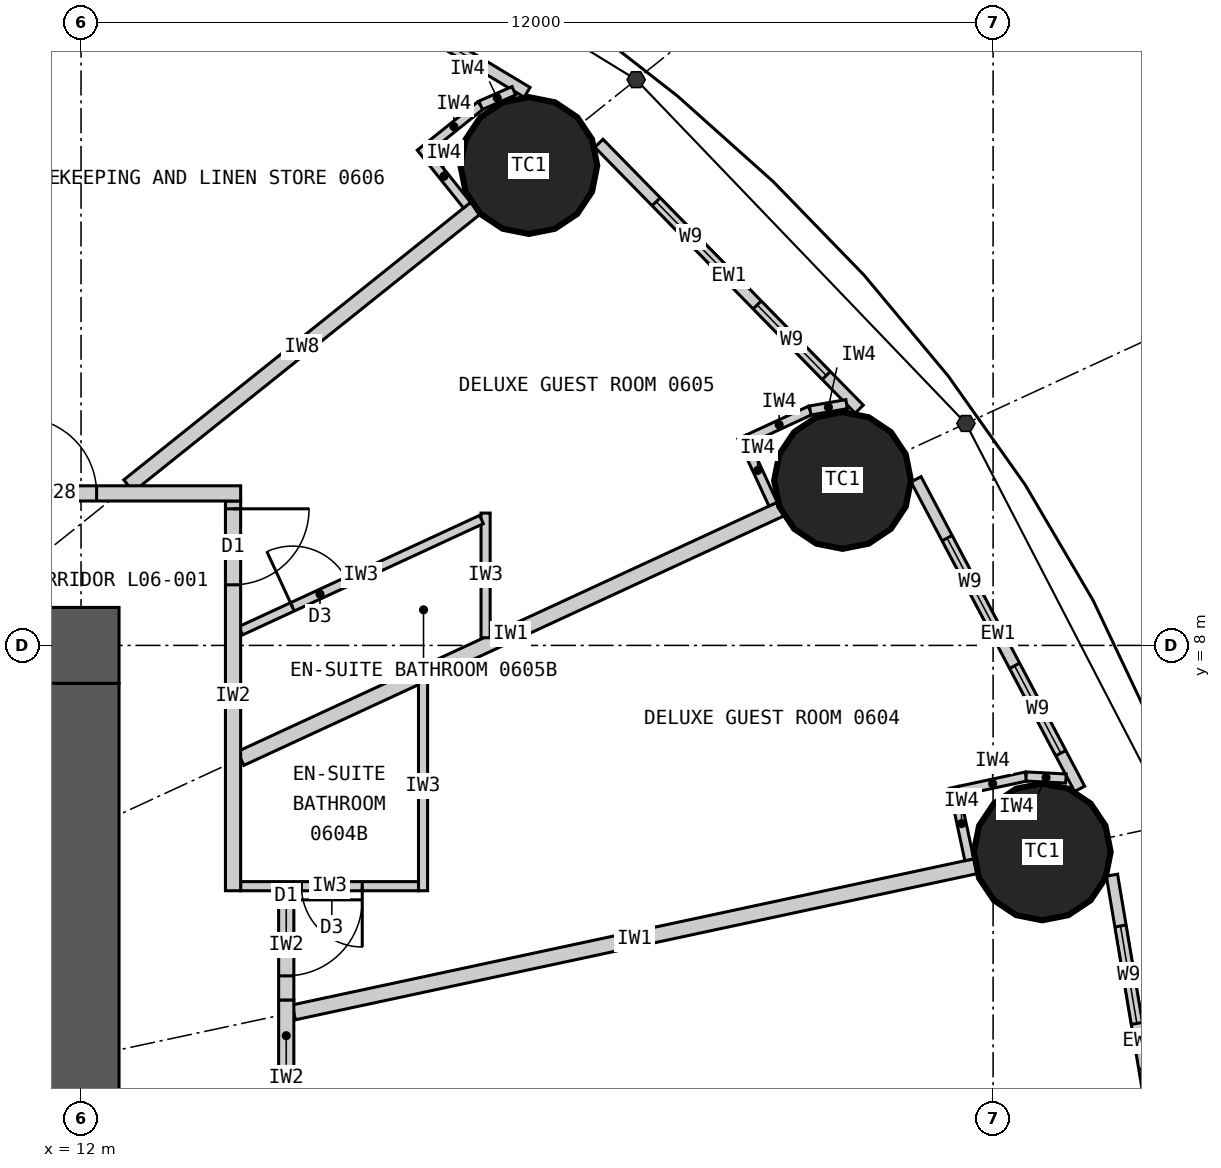
"""IFC4 building model, lengths in metres.
Left out: names, types, materials, properties, quantities, classifications, styles, units other than length and angle.
Written with IfcOpenShell. Run it as: python <this file> out.ifc"""

import sys

from ifc_helpers import new_model, si_unit, direction, frame, frame_2d, origin, origin_2d, place, context, subcontext, project, spatial, rectangle, circle, extrude, element, fill, save


model = new_model("IFC4")
c1 = context("Model", 3, precision=1e-05, world=origin(), true_north=direction((0.0, 1.0)))
c2 = subcontext(c1, "Body", "Model", "MODEL_VIEW")
j1 = project(units=[si_unit("LENGTHUNIT", "METRE"), si_unit("PLANEANGLEUNIT", "RADIAN")], contexts=[c1])
p1 = place(None, origin())
s1 = spatial("IfcSite", under=j1, at=p1, CompositionType="ELEMENT")
p2 = place(p1, origin())
s2 = spatial("IfcBuilding", under=s1, at=p2, CompositionType="ELEMENT")
p3 = place(p2, frame((0.0, 0.0, 32.7)))
s3 = spatial("IfcBuildingStorey", under=s2, at=p3, CompositionType="ELEMENT", Elevation=32.7)
for number, where, z_axis, x_axis in (
    (1, (24.647, 5.283, 0.0), (0.0, 0.0, 1.0), (1.0, 0.0, 0.0)),
    (2, (22.019, 10.17, 0.0), (0.0, 0.0, 1.0), (1.0, 0.0, 0.0)),
    (3, (17.892, 14.313, 0.0), (0.0, 0.0, 1.0), (1.0, 0.0, 0.0)),
):
    element("IfcColumn", number, at=place(p3, frame(where, z_axis=z_axis, x_axis=x_axis)), inside=s3, PredefinedType="COLUMN", context=c2, shape_type="SweptSolid", body=[
        extrude(circle(Radius=0.9, at=origin_2d()), origin(), (0.0, 0.0, 1.0), 3.3),
    ])
p4 = place(p3, frame((-12.5, 8.0, 0.0), z_axis=(0.0, 0.0, 1.0), x_axis=(1.0, 0.0, 0.0)))
e4 = element("IfcWall", 4, at=p4, inside=s3, PredefinedType="SHEAR", context=c2, shape_type="SweptSolid", body=[
    extrude(rectangle(XDim=25.0, YDim=1.0, at=frame_2d((12.5, 0.0))), origin(), (0.0, 0.0, 1.0), 3.3),
])
p5 = place(p4, frame((11.2, 0.0, 0.0)))
e5 = element("IfcOpeningElement", 5, at=p5, cuts=e4, PredefinedType="OPENING", context=c2, shape_type="SweptSolid", body=[
    extrude(rectangle(XDim=1.2, YDim=2.2, at=frame_2d((0.6, 1.1))), frame((0.0, 0.51, 0.0), z_axis=(0.0, -1.0, 0.0), x_axis=(1.0, 0.0, 0.0)), (0.0, 0.0, 1.0), 1.02),
])
p6 = place(p4, frame((18.8, 0.0, 0.0)))
e6 = element("IfcOpeningElement", 6, at=p6, cuts=e4, PredefinedType="OPENING", context=c2, shape_type="SweptSolid", body=[
    extrude(rectangle(XDim=0.9, YDim=2.2, at=frame_2d((0.45, 1.1))), frame((0.0, 0.51, 0.0), z_axis=(0.0, -1.0, 0.0), x_axis=(1.0, 0.0, 0.0)), (0.0, 0.0, 1.0), 1.02),
])
p7 = place(p3, frame((12.0, -7.5, 0.0), z_axis=(0.0, 0.0, 1.0), x_axis=(0.0, 1.0, 0.0)))
e7 = element("IfcWall", 7, at=p7, inside=s3, PredefinedType="SHEAR", context=c2, shape_type="SweptSolid", body=[
    extrude(rectangle(XDim=15.0, YDim=1.0, at=frame_2d((7.5, 0.0))), origin(), (0.0, 0.0, 1.0), 3.3),
])
p8 = place(p7, frame((6.6, 0.0, 0.0)))
e8 = element("IfcOpeningElement", 8, at=p8, cuts=e7, PredefinedType="OPENING", context=c2, shape_type="SweptSolid", body=[
    extrude(rectangle(XDim=1.8, YDim=2.2, at=frame_2d((0.9, 1.1))), frame((0.0, 0.51, 0.0), z_axis=(0.0, -1.0, 0.0), x_axis=(1.0, 0.0, 0.0)), (0.0, 0.0, 1.0), 1.02),
])
p9 = place(p3, frame((26.297, 0.611, 0.0), z_axis=(0.0, 0.0, 1.0), x_axis=(-0.165641751141, 0.986185991727, 0.0)))
e9 = element("IfcWall", 9, at=p9, inside=s3, PredefinedType="ELEMENTEDWALL", context=c2, shape_type="SweptSolid", body=[
    extrude(rectangle(XDim=4.428, YDim=0.15, at=frame_2d((2.214, 0.0))), origin(), (0.0, 0.0, 1.0), 3.12),
])
p10 = place(p9, frame((0.55, 0.0, 0.9)))
e10 = element("IfcOpeningElement", 10, at=p10, cuts=e9, PredefinedType="OPENING", context=c2, shape_type="SweptSolid", body=[
    extrude(rectangle(XDim=1.3, YDim=1.9, at=frame_2d((0.65, 0.95))), frame((0.0, 0.085, 0.0), z_axis=(0.0, -1.0, 0.0), x_axis=(1.0, 0.0, 0.0)), (0.0, 0.0, 1.0), 0.17),
])
p11 = place(p9, frame((2.45, 0.0, 0.9)))
e11 = element("IfcOpeningElement", 11, at=p11, cuts=e9, PredefinedType="OPENING", context=c2, shape_type="SweptSolid", body=[
    extrude(rectangle(XDim=1.3, YDim=1.9, at=frame_2d((0.65, 0.95))), frame((0.0, 0.085, 0.0), z_axis=(0.0, -1.0, 0.0), x_axis=(1.0, 0.0, 0.0)), (0.0, 0.0, 1.0), 0.17),
])
p12 = place(p3, frame((25.139, 6.113, 0.0), z_axis=(0.0, 0.0, 1.0), x_axis=(-0.467303182954, 0.884097129959, 0.0)))
e12 = element("IfcWall", 12, at=p12, inside=s3, PredefinedType="ELEMENTEDWALL", context=c2, shape_type="SweptSolid", body=[
    extrude(rectangle(XDim=4.606, YDim=0.15, at=frame_2d((2.303, 0.0))), origin(), (0.0, 0.0, 1.0), 3.12),
])
p13 = place(p12, frame((0.531, 0.0, 0.9)))
e13 = element("IfcOpeningElement", 13, at=p13, cuts=e12, PredefinedType="OPENING", context=c2, shape_type="SweptSolid", body=[
    extrude(rectangle(XDim=1.3, YDim=1.9, at=frame_2d((0.65, 0.95))), frame((0.0, 0.085, 0.0), z_axis=(0.0, -1.0, 0.0), x_axis=(1.0, 0.0, 0.0)), (0.0, 0.0, 1.0), 0.17),
])
p14 = place(p12, frame((2.432, 0.0, 0.9)))
e14 = element("IfcOpeningElement", 14, at=p14, cuts=e12, PredefinedType="OPENING", context=c2, shape_type="SweptSolid", body=[
    extrude(rectangle(XDim=1.3, YDim=1.9, at=frame_2d((0.65, 0.95))), frame((0.0, 0.085, 0.0), z_axis=(0.0, -1.0, 0.0), x_axis=(1.0, 0.0, 0.0)), (0.0, 0.0, 1.0), 0.17),
])
p15 = place(p3, frame((22.239, 11.108, 0.0), z_axis=(0.0, 0.0, 1.0), x_axis=(-0.699612594083, 0.714522370679, 0.0)))
e15 = element("IfcWall", 15, at=p15, inside=s3, PredefinedType="ELEMENTEDWALL", context=c2, shape_type="SweptSolid", body=[
    extrude(rectangle(XDim=4.896, YDim=0.15, at=frame_2d((2.448, 0.0))), origin(), (0.0, 0.0, 1.0), 3.12),
])
p16 = place(p15, frame((0.619, 0.0, 0.9)))
e16 = element("IfcOpeningElement", 16, at=p16, cuts=e15, PredefinedType="OPENING", context=c2, shape_type="SweptSolid", body=[
    extrude(rectangle(XDim=1.3, YDim=1.9, at=frame_2d((0.65, 0.95))), frame((0.0, 0.085, 0.0), z_axis=(0.0, -1.0, 0.0), x_axis=(1.0, 0.0, 0.0)), (0.0, 0.0, 1.0), 0.17),
])
p17 = place(p15, frame((2.519, 0.0, 0.9)))
e17 = element("IfcOpeningElement", 17, at=p17, cuts=e15, PredefinedType="OPENING", context=c2, shape_type="SweptSolid", body=[
    extrude(rectangle(XDim=1.3, YDim=1.9, at=frame_2d((0.65, 0.95))), frame((0.0, 0.085, 0.0), z_axis=(0.0, -1.0, 0.0), x_axis=(1.0, 0.0, 0.0)), (0.0, 0.0, 1.0), 0.17),
])
p18 = place(p3, frame((17.869, 15.277, 0.0), z_axis=(0.0, 0.0, 1.0), x_axis=(-0.856958191554, 0.515385931054, 0.0)))
e18 = element("IfcWall", 18, at=p18, inside=s3, PredefinedType="ELEMENTEDWALL", context=c2, shape_type="SweptSolid", body=[
    extrude(rectangle(XDim=5.201, YDim=0.15, at=frame_2d((2.601, 0.0))), origin(), (0.0, 0.0, 1.0), 3.12),
])
p19 = place(p18, frame((0.776, 0.0, 0.9)))
e19 = element("IfcOpeningElement", 19, at=p19, cuts=e18, PredefinedType="OPENING", context=c2, shape_type="SweptSolid", body=[
    extrude(rectangle(XDim=1.3, YDim=1.9, at=frame_2d((0.65, 0.95))), frame((0.0, 0.085, 0.0), z_axis=(0.0, -1.0, 0.0), x_axis=(1.0, 0.0, 0.0)), (0.0, 0.0, 1.0), 0.17),
])
p20 = place(p18, frame((2.676, 0.0, 0.9)))
e20 = element("IfcOpeningElement", 20, at=p20, cuts=e18, PredefinedType="OPENING", context=c2, shape_type="SweptSolid", body=[
    extrude(rectangle(XDim=1.3, YDim=1.9, at=frame_2d((0.65, 0.95))), frame((0.0, 0.085, 0.0), z_axis=(0.0, -1.0, 0.0), x_axis=(1.0, 0.0, 0.0)), (0.0, 0.0, 1.0), 0.17),
])
p21 = place(p3, frame((14.8, 3.173, 0.0), z_axis=(0.0, 0.0, 1.0), x_axis=(0.977788776497, 0.209592720667, 0.0)))
e21 = element("IfcWall", 21, at=p21, inside=s3, PredefinedType="PARTITIONING", context=c2, shape_type="SweptSolid", body=[
    extrude(rectangle(XDim=9.171, YDim=0.2, at=frame_2d((4.585, 0.0))), origin(), (0.0, 0.0, 1.0), 2.32),
])
p22 = place(p3, frame((14.1, 6.512, 0.0), z_axis=(0.0, 0.0, 1.0), x_axis=(0.907842433118, 0.41931147925, 0.0)))
e22 = element("IfcWall", 22, at=p22, inside=s3, PredefinedType="PARTITIONING", context=c2, shape_type="SweptSolid", body=[
    extrude(rectangle(XDim=7.823, YDim=0.2, at=frame_2d((3.912, 0.0))), origin(), (0.0, 0.0, 1.0), 2.32),
])
p23 = place(p3, frame((12.625, 10.1, 0.0), z_axis=(0.0, 0.0, 1.0), x_axis=(0.780872884676, 0.624689953479, 0.0)))
e23 = element("IfcWall", 23, at=p23, inside=s3, PredefinedType="PARTITIONING", context=c2, shape_type="SweptSolid", body=[
    extrude(rectangle(XDim=5.845, YDim=0.2, at=frame_2d((2.922, 0.0))), origin(), (0.0, 0.0, 1.0), 2.32),
])
p24 = place(p3, frame((7.289, 10.1, 0.0), z_axis=(0.0, 0.0, 1.0), x_axis=(0.585216319319, 0.810877216108, 0.0)))
e24 = element("IfcWall", 24, at=p24, inside=s3, PredefinedType="PARTITIONING", context=c2, shape_type="SweptSolid", body=[
    extrude(rectangle(XDim=8.16, YDim=0.2, at=frame_2d((4.08, 0.0))), origin(), (0.0, 0.0, 1.0), 2.32),
])
p25 = place(p3, frame((16.5, 7.521, 0.0), z_axis=(0.0, 0.0, 1.0), x_axis=(0.0, -1.0, 0.0)))
e25 = element("IfcWall", 25, at=p25, inside=s3, PredefinedType="PARTITIONING", context=c2, shape_type="SweptSolid", body=[
    extrude(rectangle(XDim=2.749, YDim=0.12, at=frame_2d((1.374, 0.0))), origin(), (0.0, 0.0, 1.0), 3.12),
])
p26 = place(p3, frame((14.1, 4.833, 0.0), z_axis=(0.0, 0.0, 1.0), x_axis=(1.0, 0.0, 0.0)))
e26 = element("IfcWall", 26, at=p26, inside=s3, PredefinedType="PARTITIONING", context=c2, shape_type="SweptSolid", body=[
    extrude(rectangle(XDim=2.34, YDim=0.12, at=frame_2d((1.17, 0.0))), origin(), (0.0, 0.0, 1.0), 3.12),
])
p27 = place(p26, frame((0.8, 0.0, 0.0)))
e27 = element("IfcOpeningElement", 27, at=p27, cuts=e26, PredefinedType="OPENING", context=c2, shape_type="SweptSolid", body=[
    extrude(rectangle(XDim=0.8, YDim=2.1, at=frame_2d((0.4, 1.05))), frame((0.0, 0.07, 0.0), z_axis=(0.0, -1.0, 0.0), x_axis=(1.0, 0.0, 0.0)), (0.0, 0.0, 1.0), 0.14),
])
p28 = place(p3, frame((17.323, 8.101, 0.0), z_axis=(0.0, 0.0, 1.0), x_axis=(0.0, 1.0, 0.0)))
e28 = element("IfcWall", 28, at=p28, inside=s3, PredefinedType="PARTITIONING", context=c2, shape_type="SweptSolid", body=[
    extrude(rectangle(XDim=1.64, YDim=0.12, at=frame_2d((0.82, 0.0))), origin(), (0.0, 0.0, 1.0), 3.12),
])
p29 = place(p3, frame((14.1, 8.193, 0.0), z_axis=(0.0, 0.0, 1.0), x_axis=(0.907836493557, 0.419324338628, 0.0)))
e29 = element("IfcWall", 29, at=p29, inside=s3, PredefinedType="PARTITIONING", context=c2, shape_type="SweptSolid", body=[
    extrude(rectangle(XDim=3.49, YDim=0.12, at=frame_2d((1.745, 0.0))), origin(), (0.0, 0.0, 1.0), 3.12),
])
p30 = place(p29, frame((0.75, 0.0, 0.0)))
e30 = element("IfcOpeningElement", 30, at=p30, cuts=e29, PredefinedType="OPENING", context=c2, shape_type="SweptSolid", body=[
    extrude(rectangle(XDim=0.8, YDim=2.1, at=frame_2d((0.4, 1.05))), frame((0.0, 0.07, 0.0), z_axis=(0.0, -1.0, 0.0), x_axis=(1.0, 0.0, 0.0)), (0.0, 0.0, 1.0), 0.14),
])
p31 = place(p3, frame((14.7, 0.958, 0.0), z_axis=(0.0, 0.0, 1.0), x_axis=(0.0, 1.0, 0.0)))
e31 = element("IfcWall", 31, at=p31, inside=s3, PredefinedType="PARTITIONING", context=c2, shape_type="SweptSolid", body=[
    extrude(rectangle(XDim=1.44, YDim=0.2, at=frame_2d((0.72, 0.0))), origin(), (0.0, 0.0, 1.0), 3.12),
])
p32 = place(p31, frame((0.12, 0.0, 0.0)))
e32 = element("IfcOpeningElement", 32, at=p32, cuts=e31, PredefinedType="OPENING", context=c2, shape_type="SweptSolid", body=[
    extrude(rectangle(XDim=1.0, YDim=2.2, at=frame_2d((0.5, 1.1))), frame((0.0, 0.11, 0.0), z_axis=(0.0, -1.0, 0.0), x_axis=(1.0, 0.0, 0.0)), (0.0, 0.0, 1.0), 0.22),
])
p33 = place(p3, frame((14.7, 3.333, 0.0), z_axis=(0.0, 0.0, 1.0), x_axis=(0.0, 1.0, 0.0)))
e33 = element("IfcWall", 33, at=p33, inside=s3, PredefinedType="PARTITIONING", context=c2, shape_type="SweptSolid", body=[
    extrude(rectangle(XDim=1.44, YDim=0.2, at=frame_2d((0.72, 0.0))), origin(), (0.0, 0.0, 1.0), 3.12),
])
p34 = place(p33, frame((0.32, 0.0, 0.0)))
e34 = element("IfcOpeningElement", 34, at=p34, cuts=e33, PredefinedType="OPENING", context=c2, shape_type="SweptSolid", body=[
    extrude(rectangle(XDim=1.0, YDim=2.2, at=frame_2d((0.5, 1.1))), frame((0.0, 0.11, 0.0), z_axis=(0.0, -1.0, 0.0), x_axis=(1.0, 0.0, 0.0)), (0.0, 0.0, 1.0), 0.22),
])
p35 = place(p3, frame((14.7, 2.398, 0.0), z_axis=(0.0, 0.0, 1.0), x_axis=(0.0, 1.0, 0.0)))
e35 = element("IfcWall", 35, at=p35, inside=s3, PredefinedType="PARTITIONING", context=c2, shape_type="SweptSolid", body=[
    extrude(rectangle(XDim=0.935, YDim=0.2, at=frame_2d((0.467, 0.0))), origin(), (0.0, 0.0, 1.0), 3.12),
])
p36 = place(p3, frame((14.0, 4.772, 0.0), z_axis=(0.0, 0.0, 1.0), x_axis=(0.0, 1.0, 0.0)))
e36 = element("IfcWall", 36, at=p36, inside=s3, PredefinedType="PARTITIONING", context=c2, shape_type="SweptSolid", body=[
    extrude(rectangle(XDim=5.127, YDim=0.2, at=frame_2d((2.564, 0.0))), origin(), (0.0, 0.0, 1.0), 3.12),
])
p37 = place(p36, frame((4.025, 0.0, 0.0)))
e37 = element("IfcOpeningElement", 37, at=p37, cuts=e36, PredefinedType="OPENING", context=c2, shape_type="SweptSolid", body=[
    extrude(rectangle(XDim=1.0, YDim=2.2, at=frame_2d((0.5, 1.1))), frame((0.0, 0.11, 0.0), z_axis=(0.0, -1.0, 0.0), x_axis=(1.0, 0.0, 0.0)), (0.0, 0.0, 1.0), 0.22),
])
p38 = place(p3, frame((5.549, 10.0, 0.0), z_axis=(0.0, 0.0, 1.0), x_axis=(1.0, 0.0, 0.0)))
e38 = element("IfcWall", 38, at=p38, inside=s3, PredefinedType="PARTITIONING", context=c2, shape_type="SweptSolid", body=[
    extrude(rectangle(XDim=8.551, YDim=0.2, at=frame_2d((4.275, 0.0))), origin(), (0.0, 0.0, 1.0), 3.12),
])
p39 = place(p38, frame((5.656, 0.0, 0.0)))
e39 = element("IfcOpeningElement", 39, at=p39, cuts=e38, PredefinedType="OPENING", context=c2, shape_type="SweptSolid", body=[
    extrude(rectangle(XDim=1.0, YDim=2.2, at=frame_2d((0.5, 1.1))), frame((0.0, 0.11, 0.0), z_axis=(0.0, -1.0, 0.0), x_axis=(1.0, 0.0, 0.0)), (0.0, 0.0, 1.0), 0.22),
])
p40 = place(p3, frame((23.687, 5.18, 0.0), z_axis=(0.0, 0.0, 1.0), x_axis=(-0.209443540911, 0.977820741839, 0.0)))
e40 = element("IfcWall", 40, at=p40, inside=s3, PredefinedType="PARTITIONING", context=c2, shape_type="SweptSolid", body=[
    extrude(rectangle(XDim=0.975, YDim=0.12, at=frame_2d((0.487, 0.0))), origin(), (0.0, 0.0, 1.0), 3.12),
])
p41 = place(p3, frame((23.554, 6.087, 0.0), z_axis=(0.0, 0.0, 1.0), x_axis=(0.977762694187, 0.209714362543, 0.0)))
e41 = element("IfcWall", 41, at=p41, inside=s3, PredefinedType="PARTITIONING", context=c2, shape_type="SweptSolid", body=[
    extrude(rectangle(XDim=0.9, YDim=0.12, at=frame_2d((0.45, 0.0))), origin(), (0.0, 0.0, 1.0), 3.12),
])
p42 = place(p3, frame((24.434, 6.275, 0.0), z_axis=(0.0, 0.0, 1.0), x_axis=(0.998714959873, -0.050679669751, 0.0)))
e42 = element("IfcWall", 42, at=p42, inside=s3, PredefinedType="PARTITIONING", context=c2, shape_type="SweptSolid", body=[
    extrude(rectangle(XDim=0.525, YDim=0.12, at=frame_2d((0.263, 0.0))), origin(), (0.0, 0.0, 1.0), 3.12),
])
p43 = place(p3, frame((21.106, 9.858, 0.0), z_axis=(0.0, 0.0, 1.0), x_axis=(-0.419344098106, 0.907827366509, 0.0)))
e43 = element("IfcWall", 43, at=p43, inside=s3, PredefinedType="PARTITIONING", context=c2, shape_type="SweptSolid", body=[
    extrude(rectangle(XDim=0.975, YDim=0.12, at=frame_2d((0.487, 0.0))), origin(), (0.0, 0.0, 1.0), 3.12),
])
p44 = place(p3, frame((20.777, 10.714, 0.0), z_axis=(0.0, 0.0, 1.0), x_axis=(0.907832324198, 0.419333365166, 0.0)))
e44 = element("IfcWall", 44, at=p44, inside=s3, PredefinedType="PARTITIONING", context=c2, shape_type="SweptSolid", body=[
    extrude(rectangle(XDim=0.9, YDim=0.12, at=frame_2d((0.45, 0.0))), origin(), (0.0, 0.0, 1.0), 3.12),
])
p45 = place(p3, frame((21.594, 11.091, 0.0), z_axis=(0.0, 0.0, 1.0), x_axis=(0.985483306792, 0.169772353566, 0.0)))
e45 = element("IfcWall", 45, at=p45, inside=s3, PredefinedType="PARTITIONING", context=c2, shape_type="SweptSolid", body=[
    extrude(rectangle(XDim=0.486, YDim=0.12, at=frame_2d((0.243, 0.0))), origin(), (0.0, 0.0, 1.0), 3.12),
])
p46 = place(p3, frame((17.08, 13.792, 0.0), z_axis=(0.0, 0.0, 1.0), x_axis=(-0.624756144097, 0.780819928289, 0.0)))
e46 = element("IfcWall", 46, at=p46, inside=s3, PredefinedType="PARTITIONING", context=c2, shape_type="SweptSolid", body=[
    extrude(rectangle(XDim=0.975, YDim=0.12, at=frame_2d((0.487, 0.0))), origin(), (0.0, 0.0, 1.0), 3.12),
])
p47 = place(p3, frame((16.555, 14.543, 0.0), z_axis=(0.0, 0.0, 1.0), x_axis=(0.780789399477, 0.62479429708, 0.0)))
e47 = element("IfcWall", 47, at=p47, inside=s3, PredefinedType="PARTITIONING", context=c2, shape_type="SweptSolid", body=[
    extrude(rectangle(XDim=0.9, YDim=0.12, at=frame_2d((0.45, 0.0))), origin(), (0.0, 0.0, 1.0), 3.12),
])
p48 = place(p3, frame((17.258, 15.106, 0.0), z_axis=(0.0, 0.0, 1.0), x_axis=(0.916098562583, 0.400953143937, 0.0)))
e48 = element("IfcWall", 48, at=p48, inside=s3, PredefinedType="PARTITIONING", context=c2, shape_type="SweptSolid", body=[
    extrude(rectangle(XDim=0.477, YDim=0.12, at=frame_2d((0.238, 0.0))), origin(), (0.0, 0.0, 1.0), 3.12),
])
p49 = place(p11, origin())
e49 = element("IfcWindow", 49, at=p49, inside=s3, PartitioningType="SINGLE_PANEL", PredefinedType="WINDOW", context=c2, shape_type="SweptSolid", body=[
    extrude(rectangle(XDim=1.3, YDim=1.9, at=frame_2d((0.65, 0.95))), frame((0.0, 0.03, 0.0), z_axis=(0.0, -1.0, 0.0), x_axis=(1.0, 0.0, 0.0)), (0.0, 0.0, 1.0), 0.06),
])
fill(e11, e49)
p50 = place(p13, origin())
e50 = element("IfcWindow", 50, at=p50, inside=s3, PartitioningType="SINGLE_PANEL", PredefinedType="WINDOW", context=c2, shape_type="SweptSolid", body=[
    extrude(rectangle(XDim=1.3, YDim=1.9, at=frame_2d((0.65, 0.95))), frame((0.0, 0.03, 0.0), z_axis=(0.0, -1.0, 0.0), x_axis=(1.0, 0.0, 0.0)), (0.0, 0.0, 1.0), 0.06),
])
fill(e13, e50)
p51 = place(p14, origin())
e51 = element("IfcWindow", 51, at=p51, inside=s3, PartitioningType="SINGLE_PANEL", PredefinedType="WINDOW", context=c2, shape_type="SweptSolid", body=[
    extrude(rectangle(XDim=1.3, YDim=1.9, at=frame_2d((0.65, 0.95))), frame((0.0, 0.03, 0.0), z_axis=(0.0, -1.0, 0.0), x_axis=(1.0, 0.0, 0.0)), (0.0, 0.0, 1.0), 0.06),
])
fill(e14, e51)
p52 = place(p16, origin())
e52 = element("IfcWindow", 52, at=p52, inside=s3, PartitioningType="SINGLE_PANEL", PredefinedType="WINDOW", context=c2, shape_type="SweptSolid", body=[
    extrude(rectangle(XDim=1.3, YDim=1.9, at=frame_2d((0.65, 0.95))), frame((0.0, 0.03, 0.0), z_axis=(0.0, -1.0, 0.0), x_axis=(1.0, 0.0, 0.0)), (0.0, 0.0, 1.0), 0.06),
])
fill(e16, e52)
p53 = place(p17, origin())
e53 = element("IfcWindow", 53, at=p53, inside=s3, PartitioningType="SINGLE_PANEL", PredefinedType="WINDOW", context=c2, shape_type="SweptSolid", body=[
    extrude(rectangle(XDim=1.3, YDim=1.9, at=frame_2d((0.65, 0.95))), frame((0.0, 0.03, 0.0), z_axis=(0.0, -1.0, 0.0), x_axis=(1.0, 0.0, 0.0)), (0.0, 0.0, 1.0), 0.06),
])
fill(e17, e53)
p54 = place(p19, origin())
e54 = element("IfcWindow", 54, at=p54, inside=s3, PartitioningType="SINGLE_PANEL", PredefinedType="WINDOW", context=c2, shape_type="SweptSolid", body=[
    extrude(rectangle(XDim=1.3, YDim=1.9, at=frame_2d((0.65, 0.95))), frame((0.0, 0.03, 0.0), z_axis=(0.0, -1.0, 0.0), x_axis=(1.0, 0.0, 0.0)), (0.0, 0.0, 1.0), 0.06),
])
fill(e19, e54)
p55 = place(p27, origin())
e55 = element("IfcDoor", 55, at=p55, inside=s3, OperationType="SINGLE_SWING_RIGHT", PredefinedType="DOOR", context=c2, shape_type="SweptSolid", body=[
    extrude(rectangle(XDim=0.8, YDim=2.1, at=frame_2d((0.4, 1.05))), frame((0.0, 0.025, 0.0), z_axis=(0.0, -1.0, 0.0), x_axis=(1.0, 0.0, 0.0)), (0.0, 0.0, 1.0), 0.05),
])
fill(e27, e55)
p56 = place(p34, origin())
e56 = element("IfcDoor", 56, at=p56, inside=s3, OperationType="SINGLE_SWING_RIGHT", PredefinedType="DOOR", context=c2, shape_type="SweptSolid", body=[
    extrude(rectangle(XDim=1.0, YDim=2.2, at=frame_2d((0.5, 1.1))), frame((0.0, 0.025, 0.0), z_axis=(0.0, -1.0, 0.0), x_axis=(1.0, 0.0, 0.0)), (0.0, 0.0, 1.0), 0.05),
])
fill(e34, e56)
p57 = place(p30, origin())
e57 = element("IfcDoor", 57, at=p57, inside=s3, OperationType="SINGLE_SWING_LEFT", PredefinedType="DOOR", context=c2, shape_type="SweptSolid", body=[
    extrude(rectangle(XDim=0.8, YDim=2.1, at=frame_2d((0.4, 1.05))), frame((0.0, 0.025, 0.0), z_axis=(0.0, -1.0, 0.0), x_axis=(1.0, 0.0, 0.0)), (0.0, 0.0, 1.0), 0.05),
])
fill(e30, e57)
p58 = place(p37, origin())
e58 = element("IfcDoor", 58, at=p58, inside=s3, OperationType="SINGLE_SWING_RIGHT", PredefinedType="DOOR", context=c2, shape_type="SweptSolid", body=[
    extrude(rectangle(XDim=1.0, YDim=2.2, at=frame_2d((0.5, 1.1))), frame((0.0, 0.025, 0.0), z_axis=(0.0, -1.0, 0.0), x_axis=(1.0, 0.0, 0.0)), (0.0, 0.0, 1.0), 0.05),
])
fill(e37, e58)
p59 = place(p39, origin())
e59 = element("IfcDoor", 59, at=p59, inside=s3, OperationType="SINGLE_SWING_LEFT", PredefinedType="DOOR", context=c2, shape_type="SweptSolid", body=[
    extrude(rectangle(XDim=1.0, YDim=2.2, at=frame_2d((0.5, 1.1))), frame((0.0, 0.025, 0.0), z_axis=(0.0, -1.0, 0.0), x_axis=(1.0, 0.0, 0.0)), (0.0, 0.0, 1.0), 0.05),
])
fill(e39, e59)
save(model, sys.argv[1])
